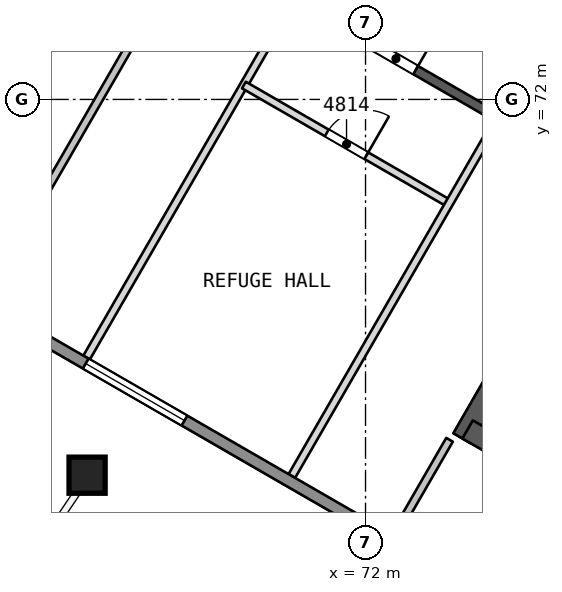
"""IFC4 building model, lengths in metres.
Left out: names, types, materials, properties, quantities, classifications, styles, units other than length and angle.
Written with IfcOpenShell. Run it as: python <this file> out.ifc"""

import sys

from ifc_helpers import new_model, si_unit, direction, frame, frame_2d, origin, origin_2d, place, context, subcontext, project, spatial, rectangle, extrude, element, fill, save


model = new_model("IFC4")
c1 = context("Model", 3, precision=1e-05, world=origin(), true_north=direction((0.0, 1.0)))
c2 = subcontext(c1, "Body", "Model", "MODEL_VIEW")
j1 = project(units=[si_unit("LENGTHUNIT", "METRE"), si_unit("PLANEANGLEUNIT", "RADIAN")], contexts=[c1])
p1 = place(None, origin())
s1 = spatial("IfcSite", under=j1, at=p1, CompositionType="ELEMENT")
p2 = place(p1, origin())
s2 = spatial("IfcBuilding", under=s1, at=p2, CompositionType="ELEMENT")
p3 = place(p2, frame((0.0, 0.0, 197.0)))
s3 = spatial("IfcBuildingStorey", under=s2, at=p3, CompositionType="ELEMENT", Elevation=197.0)
p4 = place(p3, frame((60.709, 71.386, 0.0), z_axis=(0.0, 0.0, 1.0), x_axis=(0.500015938302, 0.866016201606, 0.0)))
e1 = element("IfcWall", 1, at=p4, inside=s3, PredefinedType="SHEAR", context=c2, shape_type="SweptSolid", body=[
    extrude(rectangle(XDim=10.105, YDim=0.55, at=frame_2d((5.053, 0.0))), origin(), (0.0, 0.0, 1.0), 4.4),
])
p5 = place(p4, frame((7.955, 0.0, 0.0)))
e2 = element("IfcOpeningElement", 2, at=p5, cuts=e1, PredefinedType="OPENING", context=c2, shape_type="SweptSolid", body=[
    extrude(rectangle(XDim=1.2, YDim=2.1, at=frame_2d((0.6, 1.05))), frame((0.0, 0.286, 0.0), z_axis=(0.0, -1.0, 0.0), x_axis=(1.0, 0.0, 0.0)), (0.0, 0.0, 1.0), 0.571),
])
p6 = place(p3, frame((79.659, 71.931, 0.0), z_axis=(0.0, 0.0, 1.0), x_axis=(-0.500000202252, -0.866025287014, 0.0)))
e3 = element("IfcWall", 3, at=p6, inside=s3, PredefinedType="SHEAR", context=c2, shape_type="SweptSolid", body=[
    extrude(rectangle(XDim=10.221, YDim=0.55, at=frame_2d((5.111, 0.0))), origin(), (0.0, 0.0, 1.0), 4.4),
])
p7 = place(p6, frame((0.791, 0.0, 0.0)))
e4 = element("IfcOpeningElement", 4, at=p7, cuts=e3, PredefinedType="OPENING", context=c2, shape_type="SweptSolid", body=[
    extrude(rectangle(XDim=1.2, YDim=2.1, at=frame_2d((0.6, 1.05))), frame((0.0, 0.286, 0.0), z_axis=(0.0, -1.0, 0.0), x_axis=(1.0, 0.0, 0.0)), (0.0, 0.0, 1.0), 0.571),
])
p8 = place(p3, frame((74.686, 63.317, 0.0), z_axis=(0.0, 0.0, 1.0), x_axis=(0.866024505738, -0.500001555459, 0.0)))
e5 = element("IfcWall", 5, at=p8, inside=s3, PredefinedType="SHEAR", context=c2, shape_type="SweptSolid", body=[
    extrude(rectangle(XDim=14.059, YDim=0.55, at=frame_2d((7.029, 0.0))), origin(), (0.0, 0.0, 1.0), 4.4),
])
p9 = place(p8, frame((6.475, 0.0, 0.0)))
e6 = element("IfcOpeningElement", 6, at=p9, cuts=e5, PredefinedType="OPENING", context=c2, shape_type="SweptSolid", body=[
    extrude(rectangle(XDim=1.1, YDim=2.1, at=frame_2d((0.55, 1.05))), frame((0.0, 0.286, 0.0), z_axis=(0.0, -1.0, 0.0), x_axis=(1.0, 0.0, 0.0)), (0.0, 0.0, 1.0), 0.571),
])
p10 = place(p3, frame((64.7, 77.748, 0.0), z_axis=(0.0, 0.0, 1.0), x_axis=(0.866026492143, -0.499998114903, 0.0)))
e7 = element("IfcWall", 7, at=p10, inside=s3, PredefinedType="SHEAR", context=c2, shape_type="SweptSolid", body=[
    extrude(rectangle(XDim=15.588, YDim=0.25, at=frame_2d((7.794, 0.0))), origin(), (0.0, 0.0, 1.0), 3.95),
])
p11 = place(p10, frame((0.959, 0.0, 0.0)))
e8 = element("IfcOpeningElement", 8, at=p11, cuts=e7, PredefinedType="OPENING", context=c2, shape_type="SweptSolid", body=[
    extrude(rectangle(XDim=1.2, YDim=2.4, at=frame_2d((0.6, 1.2))), frame((0.0, 0.135, 0.0), z_axis=(0.0, -1.0, 0.0), x_axis=(1.0, 0.0, 0.0)), (0.0, 0.0, 1.0), 0.271),
])
p12 = place(p10, frame((4.076, 0.0, 0.0)))
e9 = element("IfcOpeningElement", 9, at=p12, cuts=e7, PredefinedType="OPENING", context=c2, shape_type="SweptSolid", body=[
    extrude(rectangle(XDim=1.2, YDim=2.4, at=frame_2d((0.6, 1.2))), frame((0.0, 0.135, 0.0), z_axis=(0.0, -1.0, 0.0), x_axis=(1.0, 0.0, 0.0)), (0.0, 0.0, 1.0), 0.271),
])
p13 = place(p10, frame((8.753, 0.0, 0.0)))
e10 = element("IfcOpeningElement", 10, at=p13, cuts=e7, PredefinedType="OPENING", context=c2, shape_type="SweptSolid", body=[
    extrude(rectangle(XDim=1.2, YDim=2.4, at=frame_2d((0.6, 1.2))), frame((0.0, 0.135, 0.0), z_axis=(0.0, -1.0, 0.0), x_axis=(1.0, 0.0, 0.0)), (0.0, 0.0, 1.0), 0.271),
])
p14 = place(p10, frame((13.43, 0.0, 0.0)))
e11 = element("IfcOpeningElement", 11, at=p14, cuts=e7, PredefinedType="OPENING", context=c2, shape_type="SweptSolid", body=[
    extrude(rectangle(XDim=1.2, YDim=2.4, at=frame_2d((0.6, 1.2))), frame((0.0, 0.135, 0.0), z_axis=(0.0, -1.0, 0.0), x_axis=(1.0, 0.0, 0.0)), (0.0, 0.0, 1.0), 0.271),
])
p15 = place(p3, frame((64.661, 62.092, 0.0), z_axis=(0.010041240412, 0.017475086904, 0.999796876785), x_axis=(-0.867057102468, 0.498208772564, 8.7237e-08)))
e12 = element("IfcColumn", 12, at=p15, inside=s3, PredefinedType="COLUMN", context=c2, shape_type="SweptSolid", body=[
    extrude(rectangle(XDim=0.95, YDim=0.95, at=origin_2d()), origin(), (0.0, 0.0, 1.0), 4.401),
])
p16 = place(p3, frame((61.96, 66.768, 0.0), z_axis=(0.0, 0.0, 1.0), x_axis=(0.49999829022, 0.866026390924, 0.0)))
e13 = element("IfcWall", 13, at=p16, inside=s3, PredefinedType="PARTITIONING", context=c2, shape_type="SweptSolid", body=[
    extrude(rectangle(XDim=10.879, YDim=0.2, at=frame_2d((5.44, 0.0))), origin(), (0.0, 0.0, 1.0), 3.95),
])
p17 = place(p3, frame((64.66, 65.209, 0.0), z_axis=(0.0, 0.0, 1.0), x_axis=(0.500015120401, 0.866016673841, 0.0)))
e14 = element("IfcWall", 14, at=p17, inside=s3, PredefinedType="PARTITIONING", context=c2, shape_type="SweptSolid", body=[
    extrude(rectangle(XDim=10.88, YDim=0.2, at=frame_2d((5.44, 0.0))), origin(), (0.0, 0.0, 1.0), 3.95),
])
p18 = place(p3, frame((68.8, 72.379, 0.0), z_axis=(0.0, 0.0, 1.0), x_axis=(0.866022576681, -0.500004896655, 0.0)))
e15 = element("IfcWall", 15, at=p18, inside=s3, PredefinedType="PARTITIONING", context=c2, shape_type="SweptSolid", body=[
    extrude(rectangle(XDim=6.235, YDim=0.2, at=frame_2d((3.118, 0.0))), origin(), (0.0, 0.0, 1.0), 3.95),
])
p19 = place(p18, frame((2.518, 0.0, 0.0)))
e16 = element("IfcOpeningElement", 16, at=p19, cuts=e15, PredefinedType="OPENING", context=c2, shape_type="SweptSolid", body=[
    extrude(rectangle(XDim=1.2, YDim=2.4, at=frame_2d((0.6, 1.2))), frame((0.0, 0.11, 0.0), z_axis=(0.0, -1.0, 0.0), x_axis=(1.0, 0.0, 0.0)), (0.0, 0.0, 1.0), 0.221),
])
p20 = place(p3, frame((70.06, 62.091, 0.0), z_axis=(0.0, 0.0, 1.0), x_axis=(0.49999829022, 0.866026390924, 0.0)))
e17 = element("IfcWall", 17, at=p20, inside=s3, PredefinedType="PARTITIONING", context=c2, shape_type="SweptSolid", body=[
    extrude(rectangle(XDim=10.879, YDim=0.2, at=frame_2d((5.44, 0.0))), origin(), (0.0, 0.0, 1.0), 3.95),
])
p21 = place(p3, frame((74.21, 63.044, 0.0), z_axis=(0.0, 0.0, 1.0), x_axis=(-0.499977468037, -0.866038412228, 0.0)))
e18 = element("IfcWall", 18, at=p21, inside=s3, PredefinedType="PARTITIONING", context=c2, shape_type="SweptSolid", body=[
    extrude(rectangle(XDim=2.901, YDim=0.2, at=frame_2d((1.45, 0.0))), origin(), (0.0, 0.0, 1.0), 3.95),
])
p22 = place(p3, frame((88.51, 51.267, 0.0), z_axis=(0.0, 0.0, 1.0), x_axis=(-0.866025243948, 0.500000276845, 0.0)))
e19 = element("IfcWall", 19, at=p22, inside=s3, PredefinedType="SOLIDWALL", context=c2, shape_type="SweptSolid", body=[
    extrude(rectangle(XDim=52.132, YDim=0.3, at=frame_2d((26.066, 0.0))), origin(), (0.0, 0.0, 1.0), 3.95),
])
p23 = place(p22, frame((42.139, 0.0, 0.9)))
e20 = element("IfcOpeningElement", 20, at=p23, cuts=e19, PredefinedType="OPENING", context=c2, shape_type="SweptSolid", body=[
    extrude(rectangle(XDim=1.8, YDim=1.5, at=frame_2d((0.9, 0.75))), frame((0.0, 0.161, 0.0), z_axis=(0.0, -1.0, 0.0), x_axis=(1.0, 0.0, 0.0)), (0.0, 0.0, 1.0), 0.321),
])
p24 = place(p22, frame((8.193, 0.0, 0.9)))
e21 = element("IfcOpeningElement", 21, at=p24, cuts=e19, PredefinedType="OPENING", context=c2, shape_type="SweptSolid", body=[
    extrude(rectangle(XDim=1.8, YDim=1.5, at=frame_2d((0.9, 0.75))), frame((0.0, 0.161, 0.0), z_axis=(0.0, -1.0, 0.0), x_axis=(1.0, 0.0, 0.0)), (0.0, 0.0, 1.0), 0.321),
])
p25 = place(p22, frame((3.713, 0.0, 0.6)))
e22 = element("IfcOpeningElement", 22, at=p25, cuts=e19, PredefinedType="OPENING", context=c2, shape_type="SweptSolid", body=[
    extrude(rectangle(XDim=3.0, YDim=2.4, at=frame_2d((1.5, 1.2))), frame((0.0, 0.161, 0.0), z_axis=(0.0, -1.0, 0.0), x_axis=(1.0, 0.0, 0.0)), (0.0, 0.0, 1.0), 0.321),
])
p26 = place(p22, frame((14.14, 0.0, 0.6)))
e23 = element("IfcOpeningElement", 23, at=p26, cuts=e19, PredefinedType="OPENING", context=c2, shape_type="SweptSolid", body=[
    extrude(rectangle(XDim=3.0, YDim=2.4, at=frame_2d((1.5, 1.2))), frame((0.0, 0.161, 0.0), z_axis=(0.0, -1.0, 0.0), x_axis=(1.0, 0.0, 0.0)), (0.0, 0.0, 1.0), 0.321),
])
p27 = place(p22, frame((24.566, 0.0, 0.6)))
e24 = element("IfcOpeningElement", 24, at=p27, cuts=e19, PredefinedType="OPENING", context=c2, shape_type="SweptSolid", body=[
    extrude(rectangle(XDim=3.0, YDim=2.4, at=frame_2d((1.5, 1.2))), frame((0.0, 0.161, 0.0), z_axis=(0.0, -1.0, 0.0), x_axis=(1.0, 0.0, 0.0)), (0.0, 0.0, 1.0), 0.321),
])
p28 = place(p22, frame((34.992, 0.0, 0.6)))
e25 = element("IfcOpeningElement", 25, at=p28, cuts=e19, PredefinedType="OPENING", context=c2, shape_type="SweptSolid", body=[
    extrude(rectangle(XDim=3.0, YDim=2.4, at=frame_2d((1.5, 1.2))), frame((0.0, 0.161, 0.0), z_axis=(0.0, -1.0, 0.0), x_axis=(1.0, 0.0, 0.0)), (0.0, 0.0, 1.0), 0.321),
])
p29 = place(p22, frame((45.419, 0.0, 0.6)))
e26 = element("IfcOpeningElement", 26, at=p29, cuts=e19, PredefinedType="OPENING", context=c2, shape_type="SweptSolid", body=[
    extrude(rectangle(XDim=3.0, YDim=2.4, at=frame_2d((1.5, 1.2))), frame((0.0, 0.161, 0.0), z_axis=(0.0, -1.0, 0.0), x_axis=(1.0, 0.0, 0.0)), (0.0, 0.0, 1.0), 0.321),
])
p30 = place(p3, frame((67.702, 78.948, 0.0), z_axis=(0.0, 0.0, 1.0), x_axis=(0.866026658274, -0.499997827154, 0.0)))
e27 = element("IfcWall", 27, at=p30, inside=s3, PredefinedType="PARTITIONING", context=c2, shape_type="SweptSolid", body=[
    extrude(rectangle(XDim=11.588, YDim=0.1, at=frame_2d((5.794, 0.0))), origin(), (0.0, 0.0, 1.0), 3.95),
])
p31 = place(p13, origin())
e28 = element("IfcDoor", 28, at=p31, inside=s3, OperationType="SINGLE_SWING_RIGHT", PredefinedType="NOTDEFINED", context=c2, shape_type="SweptSolid", body=[
    extrude(rectangle(XDim=1.2, YDim=2.4, at=frame_2d((0.6, 1.2))), frame((0.0, 0.025, 0.0), z_axis=(0.0, -1.0, 0.0), x_axis=(1.0, 0.0, 0.0)), (0.0, 0.0, 1.0), 0.05),
])
fill(e10, e28)
p32 = place(p19, origin())
e29 = element("IfcDoor", 29, at=p32, inside=s3, OperationType="SINGLE_SWING_RIGHT", PredefinedType="NOTDEFINED", context=c2, shape_type="SweptSolid", body=[
    extrude(rectangle(XDim=1.2, YDim=2.4, at=frame_2d((0.6, 1.2))), frame((0.0, 0.025, 0.0), z_axis=(0.0, -1.0, 0.0), x_axis=(1.0, 0.0, 0.0)), (0.0, 0.0, 1.0), 0.05),
])
fill(e16, e29)
p33 = place(p27, origin())
e30 = element("IfcWindow", 30, at=p33, inside=s3, PartitioningType="SINGLE_PANEL", PredefinedType="WINDOW", context=c2, shape_type="SweptSolid", body=[
    extrude(rectangle(XDim=3.0, YDim=2.4, at=frame_2d((1.5, 1.2))), frame((0.0, 0.03, 0.0), z_axis=(0.0, -1.0, 0.0), x_axis=(1.0, 0.0, 0.0)), (0.0, 0.0, 1.0), 0.06),
])
fill(e24, e30)
save(model, sys.argv[1])
